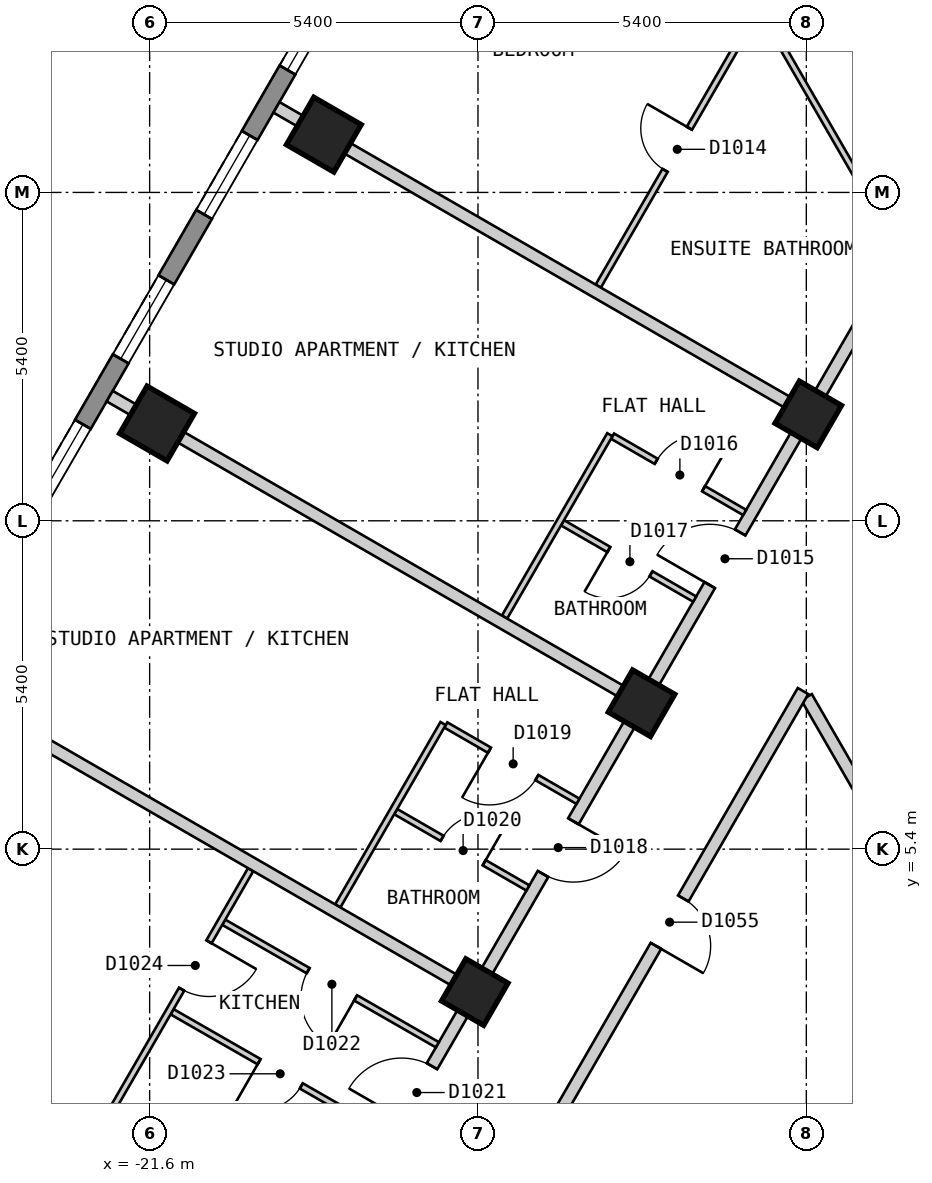
"""IFC4 building model, lengths in metres.
Left out: names, types, materials, properties, quantities, classifications, styles, units other than length and angle.
Written with IfcOpenShell. Run it as: python <this file> out.ifc"""

import sys

from ifc_helpers import new_model, si_unit, direction, frame, frame_2d, origin, origin_2d, place, context, subcontext, project, spatial, polyline, rectangle, outline, extrude, element, fill, save


model = new_model("IFC4")
c1 = context("Model", 3, precision=1e-05, world=origin(), true_north=direction((0.0, 1.0)))
c2 = subcontext(c1, "Body", "Model", "MODEL_VIEW")
j1 = project(units=[si_unit("LENGTHUNIT", "METRE"), si_unit("PLANEANGLEUNIT", "RADIAN")], contexts=[c1])
p1 = place(None, origin())
s1 = spatial("IfcSite", under=j1, at=p1, CompositionType="ELEMENT")
p2 = place(p1, origin())
s2 = spatial("IfcBuilding", under=s1, at=p2, CompositionType="ELEMENT")
p3 = place(p2, frame((0.0, 0.0, 126.6)))
s3 = spatial("IfcBuildingStorey", under=s2, at=p3, CompositionType="ELEMENT", Elevation=126.6)
for number, where, z_axis, x_axis in (
    (1, (-18.735, 17.15, 0.0), (0.0, 0.0, 1.0), (-0.5, -0.866, 0.0)),
    (2, (-21.478, 12.4, 0.0), (0.0, 0.0, 1.0), (-0.5, -0.866, 0.0)),
):
    element("IfcColumn", number, at=place(p3, frame(where, z_axis=z_axis, x_axis=x_axis)), inside=s3, PredefinedType="COLUMN", context=c2, shape_type="SweptSolid", body=[
        extrude(rectangle(XDim=0.9, YDim=0.9, at=origin_2d()), origin(), (0.0, 0.0, 1.0), 3.0),
    ])
for number, where, z_axis, x_axis in (
    (3, (-10.768, 12.55, 0.0), (0.0, 0.0, 1.0), (-0.5, -0.866, 0.0)),
    (4, (-13.51, 7.8, 0.0), (0.0, 0.0, 1.0), (-0.5, -0.866, 0.0)),
    (5, (-16.253, 3.05, 0.0), (0.0, 0.0, 1.0), (-0.5, -0.866, 0.0)),
):
    element("IfcColumn", number, at=place(p3, frame(where, z_axis=z_axis, x_axis=x_axis)), inside=s3, PredefinedType="COLUMN", context=c2, shape_type="SweptSolid", body=[
        extrude(rectangle(XDim=0.8, YDim=0.8, at=origin_2d()), origin(), (0.0, 0.0, 1.0), 3.0),
    ])
p4 = place(p3, frame((-16.555, 23.025, 0.0), z_axis=(0.0, 0.0, 1.0), x_axis=(-0.500020536353, -0.866013546791, 0.0)))
e6 = element("IfcWall", 6, at=p4, inside=s3, PredefinedType="SOLIDWALL", context=c2, shape_type="SweptSolid", body=[
    extrude(outline(polyline([(0.0, -0.15), (23.325, -0.15), (23.245, 0.15), (0.08, 0.15), (0.0, -0.15)])), origin(), (0.0, 0.0, 1.0), 2.7),
])
p5 = place(p4, frame((1.314, 0.0, 0.15)))
e7 = element("IfcOpeningElement", 7, at=p5, cuts=e6, PredefinedType="OPENING", context=c2, shape_type="SweptSolid", body=[
    extrude(rectangle(XDim=1.5, YDim=2.1, at=frame_2d((0.75, 1.05))), frame((0.0, 0.16, 0.0), z_axis=(0.0, -1.0, 0.0), x_axis=(1.0, 0.0, 0.0)), (0.0, 0.0, 1.0), 0.32),
])
p6 = place(p4, frame((4.056, 0.0, 0.15)))
e8 = element("IfcOpeningElement", 8, at=p6, cuts=e6, PredefinedType="OPENING", context=c2, shape_type="SweptSolid", body=[
    extrude(rectangle(XDim=1.5, YDim=2.1, at=frame_2d((0.75, 1.05))), frame((0.0, 0.16, 0.0), z_axis=(0.0, -1.0, 0.0), x_axis=(1.0, 0.0, 0.0)), (0.0, 0.0, 1.0), 0.32),
])
p7 = place(p4, frame((6.799, 0.0, 0.15)))
e9 = element("IfcOpeningElement", 9, at=p7, cuts=e6, PredefinedType="OPENING", context=c2, shape_type="SweptSolid", body=[
    extrude(rectangle(XDim=1.5, YDim=2.1, at=frame_2d((0.75, 1.05))), frame((0.0, 0.16, 0.0), z_axis=(0.0, -1.0, 0.0), x_axis=(1.0, 0.0, 0.0)), (0.0, 0.0, 1.0), 0.32),
])
p8 = place(p4, frame((9.541, 0.0, 0.15)))
e10 = element("IfcOpeningElement", 10, at=p8, cuts=e6, PredefinedType="OPENING", context=c2, shape_type="SweptSolid", body=[
    extrude(rectangle(XDim=1.5, YDim=2.1, at=frame_2d((0.75, 1.05))), frame((0.0, 0.16, 0.0), z_axis=(0.0, -1.0, 0.0), x_axis=(1.0, 0.0, 0.0)), (0.0, 0.0, 1.0), 0.32),
])
p9 = place(p4, frame((12.285, 0.0, 0.15)))
e11 = element("IfcOpeningElement", 11, at=p9, cuts=e6, PredefinedType="OPENING", context=c2, shape_type="SweptSolid", body=[
    extrude(rectangle(XDim=1.5, YDim=2.1, at=frame_2d((0.75, 1.05))), frame((0.0, 0.16, 0.0), z_axis=(0.0, -1.0, 0.0), x_axis=(1.0, 0.0, 0.0)), (0.0, 0.0, 1.0), 0.32),
])
p10 = place(p4, frame((15.027, 0.0, 0.15)))
e12 = element("IfcOpeningElement", 12, at=p10, cuts=e6, PredefinedType="OPENING", context=c2, shape_type="SweptSolid", body=[
    extrude(rectangle(XDim=1.5, YDim=2.1, at=frame_2d((0.75, 1.05))), frame((0.0, 0.16, 0.0), z_axis=(0.0, -1.0, 0.0), x_axis=(1.0, 0.0, 0.0)), (0.0, 0.0, 1.0), 0.32),
])
p11 = place(p4, frame((17.769, 0.0, 0.15)))
e13 = element("IfcOpeningElement", 13, at=p11, cuts=e6, PredefinedType="OPENING", context=c2, shape_type="SweptSolid", body=[
    extrude(rectangle(XDim=1.5, YDim=2.1, at=frame_2d((0.75, 1.05))), frame((0.0, 0.16, 0.0), z_axis=(0.0, -1.0, 0.0), x_axis=(1.0, 0.0, 0.0)), (0.0, 0.0, 1.0), 0.32),
])
p12 = place(p4, frame((20.512, 0.0, 0.15)))
e14 = element("IfcOpeningElement", 14, at=p12, cuts=e6, PredefinedType="OPENING", context=c2, shape_type="SweptSolid", body=[
    extrude(rectangle(XDim=1.5, YDim=2.1, at=frame_2d((0.75, 1.05))), frame((0.0, 0.16, 0.0), z_axis=(0.0, -1.0, 0.0), x_axis=(1.0, 0.0, 0.0)), (0.0, 0.0, 1.0), 0.32),
])
p13 = place(p3, frame((-10.796, 7.9, 0.0), z_axis=(0.0, 0.0, 1.0), x_axis=(0.499954271211, -0.866051803703, 0.0)))
e15 = element("IfcWall", 15, at=p13, inside=s3, PredefinedType="PARTITIONING", context=c2, shape_type="SweptSolid", body=[
    extrude(rectangle(XDim=7.536, YDim=0.2, at=frame_2d((3.768, 0.0))), origin(), (0.0, 0.0, 1.0), 2.7),
])
p14 = place(p3, frame((-15.242, 0.399, 0.0), z_axis=(0.0, 0.0, 1.0), x_axis=(0.499953615651, 0.866052182145, 0.0)))
e16 = element("IfcWall", 16, at=p14, inside=s3, PredefinedType="PARTITIONING", context=c2, shape_type="SweptSolid", body=[
    extrude(rectangle(XDim=8.777, YDim=0.2, at=frame_2d((4.388, 0.0))), origin(), (0.0, 0.0, 1.0), 2.7),
])
p15 = place(p14, frame((3.938, 0.0, 0.0)))
e17 = element("IfcOpeningElement", 17, at=p15, cuts=e16, PredefinedType="OPENING", context=c2, shape_type="SweptSolid", body=[
    extrude(rectangle(XDim=0.9, YDim=2.1, at=frame_2d((0.45, 1.05))), frame((0.0, 0.11, 0.0), z_axis=(0.0, -1.0, 0.0), x_axis=(1.0, 0.0, 0.0)), (0.0, 0.0, 1.0), 0.22),
])
p16 = place(p3, frame((-17.753, 0.45, 0.0), z_axis=(0.0, 0.0, 1.0), x_axis=(0.499990970252, 0.866030617049, 0.0)))
e18 = element("IfcWall", 18, at=p16, inside=s3, PredefinedType="PARTITIONING", context=c2, shape_type="SweptSolid", body=[
    extrude(rectangle(XDim=16.974, YDim=0.2, at=frame_2d((8.487, 0.0))), origin(), (0.0, 0.0, 1.0), 2.7),
])
p17 = place(p16, frame((10.73, 0.0, 0.0)))
e19 = element("IfcOpeningElement", 19, at=p17, cuts=e18, PredefinedType="OPENING", context=c2, shape_type="SweptSolid", body=[
    extrude(rectangle(XDim=1.0, YDim=2.1, at=frame_2d((0.5, 1.05))), frame((0.0, 0.11, 0.0), z_axis=(0.0, -1.0, 0.0), x_axis=(1.0, 0.0, 0.0)), (0.0, 0.0, 1.0), 0.22),
])
p18 = place(p16, frame((5.245, 0.0, 0.0)))
e20 = element("IfcOpeningElement", 20, at=p18, cuts=e18, PredefinedType="OPENING", context=c2, shape_type="SweptSolid", body=[
    extrude(rectangle(XDim=1.0, YDim=2.1, at=frame_2d((0.5, 1.05))), frame((0.0, 0.11, 0.0), z_axis=(0.0, -1.0, 0.0), x_axis=(1.0, 0.0, 0.0)), (0.0, 0.0, 1.0), 0.22),
])
p19 = place(p16, frame((0.594, 0.0, 0.0)))
e21 = element("IfcOpeningElement", 21, at=p19, cuts=e18, PredefinedType="OPENING", context=c2, shape_type="SweptSolid", body=[
    extrude(rectangle(XDim=1.0, YDim=2.1, at=frame_2d((0.5, 1.05))), frame((0.0, 0.11, 0.0), z_axis=(0.0, -1.0, 0.0), x_axis=(1.0, 0.0, 0.0)), (0.0, 0.0, 1.0), 0.22),
])
p20 = place(p3, frame((-14.37, 24.09, 0.0), z_axis=(0.0, 0.0, 1.0), x_axis=(0.50002438799, -0.866011322914, 0.0)))
e22 = element("IfcWall", 22, at=p20, inside=s3, PredefinedType="PARTITIONING", context=c2, shape_type="SweptSolid", body=[
    extrude(rectangle(XDim=10.266, YDim=0.1, at=frame_2d((5.133, 0.0))), origin(), (0.0, 0.0, 1.0), 2.7),
])
p21 = place(p20, frame((2.347, 0.0, 0.0)))
e23 = element("IfcOpeningElement", 23, at=p21, cuts=e22, PredefinedType="OPENING", context=c2, shape_type="SweptSolid", body=[
    extrude(rectangle(XDim=0.9, YDim=2.1, at=frame_2d((0.45, 1.05))), frame((0.0, 0.06, 0.0), z_axis=(0.0, -1.0, 0.0), x_axis=(1.0, 0.0, 0.0)), (0.0, 0.0, 1.0), 0.12),
])
p22 = place(p3, frame((-17.553, 6.017, 0.0), z_axis=(0.0, 0.0, 1.0), x_axis=(0.866038211682, -0.499977815414, 0.0)))
e24 = element("IfcWall", 24, at=p22, inside=s3, PredefinedType="PARTITIONING", context=c2, shape_type="SweptSolid", body=[
    extrude(rectangle(XDim=2.51, YDim=0.1, at=frame_2d((1.255, 0.0))), origin(), (0.0, 0.0, 1.0), 2.7),
])
p23 = place(p22, frame((0.88, 0.0, 0.0)))
e25 = element("IfcOpeningElement", 25, at=p23, cuts=e24, PredefinedType="OPENING", context=c2, shape_type="SweptSolid", body=[
    extrude(rectangle(XDim=0.8, YDim=2.1, at=frame_2d((0.4, 1.05))), frame((0.0, 0.06, 0.0), z_axis=(0.0, -1.0, 0.0), x_axis=(1.0, 0.0, 0.0)), (0.0, 0.0, 1.0), 0.12),
])
p24 = place(p3, frame((-20.381, 4.198, 0.0), z_axis=(0.0, 0.0, 1.0), x_axis=(0.867459321792, -0.497508115549, 0.0)))
e26 = element("IfcWall", 26, at=p24, inside=s3, PredefinedType="PARTITIONING", context=c2, shape_type="SweptSolid", body=[
    extrude(rectangle(XDim=4.05, YDim=0.1, at=frame_2d((2.025, 0.0))), origin(), (0.0, 0.0, 1.0), 2.7),
])
p25 = place(p24, frame((1.6, 0.0, 0.0)))
e27 = element("IfcOpeningElement", 27, at=p25, cuts=e26, PredefinedType="OPENING", context=c2, shape_type="SweptSolid", body=[
    extrude(rectangle(XDim=0.9, YDim=2.1, at=frame_2d((0.45, 1.05))), frame((0.0, 0.06, 0.0), z_axis=(0.0, -1.0, 0.0), x_axis=(1.0, 0.0, 0.0)), (0.0, 0.0, 1.0), 0.12),
])
p26 = place(p3, frame((-21.231, 2.726, 0.0), z_axis=(0.0, 0.0, 1.0), x_axis=(0.867314299312, -0.497760892607, 0.0)))
e28 = element("IfcWall", 28, at=p26, inside=s3, PredefinedType="PARTITIONING", context=c2, shape_type="SweptSolid", body=[
    extrude(rectangle(XDim=4.05, YDim=0.1, at=frame_2d((2.025, 0.0))), origin(), (0.0, 0.0, 1.0), 2.7),
])
p27 = place(p26, frame((1.65, 0.0, 0.0)))
e29 = element("IfcOpeningElement", 29, at=p27, cuts=e28, PredefinedType="OPENING", context=c2, shape_type="SweptSolid", body=[
    extrude(rectangle(XDim=0.8, YDim=2.1, at=frame_2d((0.4, 1.05))), frame((0.0, 0.06, 0.0), z_axis=(0.0, -1.0, 0.0), x_axis=(1.0, 0.0, 0.0)), (0.0, 0.0, 1.0), 0.12),
])
p28 = place(p3, frame((-16.729, 7.442, 0.0), z_axis=(0.0, 0.0, 1.0), x_axis=(0.865983051302, -0.500073349477, 0.0)))
e30 = element("IfcWall", 30, at=p28, inside=s3, PredefinedType="PARTITIONING", context=c2, shape_type="SweptSolid", body=[
    extrude(rectangle(XDim=2.509, YDim=0.1, at=frame_2d((1.255, 0.0))), origin(), (0.0, 0.0, 1.0), 2.7),
])
p29 = place(p28, frame((0.829, 0.0, 0.0)))
e31 = element("IfcOpeningElement", 31, at=p29, cuts=e30, PredefinedType="OPENING", context=c2, shape_type="SweptSolid", body=[
    extrude(rectangle(XDim=0.9, YDim=2.1, at=frame_2d((0.45, 1.05))), frame((0.0, 0.06, 0.0), z_axis=(0.0, -1.0, 0.0), x_axis=(1.0, 0.0, 0.0)), (0.0, 0.0, 1.0), 0.12),
])
p30 = place(p3, frame((-13.987, 12.192, 0.0), z_axis=(0.0, 0.0, 1.0), x_axis=(0.865983051302, -0.500073349477, 0.0)))
e32 = element("IfcWall", 32, at=p30, inside=s3, PredefinedType="PARTITIONING", context=c2, shape_type="SweptSolid", body=[
    extrude(rectangle(XDim=2.509, YDim=0.1, at=frame_2d((1.255, 0.0))), origin(), (0.0, 0.0, 1.0), 2.7),
])
p31 = place(p30, frame((0.829, 0.0, 0.0)))
e33 = element("IfcOpeningElement", 33, at=p31, cuts=e32, PredefinedType="OPENING", context=c2, shape_type="SweptSolid", body=[
    extrude(rectangle(XDim=0.9, YDim=2.1, at=frame_2d((0.45, 1.05))), frame((0.0, 0.06, 0.0), z_axis=(0.0, -1.0, 0.0), x_axis=(1.0, 0.0, 0.0)), (0.0, 0.0, 1.0), 0.12),
])
p32 = place(p3, frame((-14.81, 10.767, 0.0), z_axis=(0.0, 0.0, 1.0), x_axis=(0.866038211682, -0.499977815414, 0.0)))
e34 = element("IfcWall", 34, at=p32, inside=s3, PredefinedType="PARTITIONING", context=c2, shape_type="SweptSolid", body=[
    extrude(rectangle(XDim=2.51, YDim=0.1, at=frame_2d((1.255, 0.0))), origin(), (0.0, 0.0, 1.0), 2.7),
])
p33 = place(p32, frame((0.88, 0.0, 0.0)))
e35 = element("IfcOpeningElement", 35, at=p33, cuts=e34, PredefinedType="OPENING", context=c2, shape_type="SweptSolid", body=[
    extrude(rectangle(XDim=0.8, YDim=2.1, at=frame_2d((0.4, 1.05))), frame((0.0, 0.06, 0.0), z_axis=(0.0, -1.0, 0.0), x_axis=(1.0, 0.0, 0.0)), (0.0, 0.0, 1.0), 0.12),
])
p34 = place(p3, frame((-18.506, 4.466, 0.0), z_axis=(0.0, 0.0, 1.0), x_axis=(0.500027479704, 0.866009537788, 0.0)))
e36 = element("IfcWall", 36, at=p34, inside=s3, PredefinedType="PARTITIONING", context=c2, shape_type="SweptSolid", body=[
    extrude(rectangle(XDim=3.464, YDim=0.1, at=frame_2d((1.732, 0.0))), origin(), (0.0, 0.0, 1.0), 2.7),
])
p35 = place(p3, frame((-15.763, 9.217, 0.0), z_axis=(0.0, 0.0, 1.0), x_axis=(0.500096714907, 0.865969558206, 0.0)))
e37 = element("IfcWall", 37, at=p35, inside=s3, PredefinedType="PARTITIONING", context=c2, shape_type="SweptSolid", body=[
    extrude(rectangle(XDim=3.463, YDim=0.1, at=frame_2d((1.731, 0.0))), origin(), (0.0, 0.0, 1.0), 2.7),
])
p36 = place(p3, frame((-14.222, 14.659, 0.0), z_axis=(0.0, 0.0, 1.0), x_axis=(0.500053212623, 0.865994679283, 0.0)))
e38 = element("IfcWall", 38, at=p36, inside=s3, PredefinedType="PARTITIONING", context=c2, shape_type="SweptSolid", body=[
    extrude(rectangle(XDim=5.239, YDim=0.1, at=frame_2d((2.62, 0.0))), origin(), (0.0, 0.0, 1.0), 2.7),
])
p37 = place(p36, frame((2.198, 0.0, 0.0)))
e39 = element("IfcOpeningElement", 39, at=p37, cuts=e38, PredefinedType="OPENING", context=c2, shape_type="SweptSolid", body=[
    extrude(rectangle(XDim=0.8, YDim=2.1, at=frame_2d((0.4, 1.05))), frame((0.0, 0.06, 0.0), z_axis=(0.0, -1.0, 0.0), x_axis=(1.0, 0.0, 0.0)), (0.0, 0.0, 1.0), 0.12),
])
p38 = place(p3, frame((-22.603, 0.449, 0.0), z_axis=(0.0, 0.0, 1.0), x_axis=(0.500022588228, 0.866012362072, 0.0)))
e40 = element("IfcWall", 40, at=p38, inside=s3, PredefinedType="PARTITIONING", context=c2, shape_type="SweptSolid", body=[
    extrude(rectangle(XDim=5.328, YDim=0.1, at=frame_2d((2.664, 0.0))), origin(), (0.0, 0.0, 1.0), 2.7),
])
p39 = place(p38, frame((3.058, 0.0, 0.0)))
e41 = element("IfcOpeningElement", 41, at=p39, cuts=e40, PredefinedType="OPENING", context=c2, shape_type="SweptSolid", body=[
    extrude(rectangle(XDim=0.9, YDim=2.1, at=frame_2d((0.45, 1.05))), frame((0.0, 0.06, 0.0), z_axis=(0.0, -1.0, 0.0), x_axis=(1.0, 0.0, 0.0)), (0.0, 0.0, 1.0), 0.12),
])
p40 = place(p3, frame((-24.999, 8.1, 0.0), z_axis=(0.0, 0.0, 1.0), x_axis=(0.866016855193, -0.500014806302, 0.0)))
e42 = element("IfcWall", 42, at=p40, inside=s3, PredefinedType="PARTITIONING", context=c2, shape_type="SweptSolid", body=[
    extrude(rectangle(XDim=10.0, YDim=0.2, at=frame_2d((5.0, 0.0))), origin(), (0.0, 0.0, 1.0), 2.7),
])
p41 = place(p3, frame((-22.257, 12.85, 0.0), z_axis=(0.0, 0.0, 1.0), x_axis=(0.866047370643, -0.499961950354, 0.0)))
e43 = element("IfcWall", 43, at=p41, inside=s3, PredefinedType="PARTITIONING", context=c2, shape_type="SweptSolid", body=[
    extrude(rectangle(XDim=10.001, YDim=0.2, at=frame_2d((5.0, 0.0))), origin(), (0.0, 0.0, 1.0), 2.7),
])
p42 = place(p3, frame((-19.514, 17.599, 0.0), z_axis=(0.0, 0.0, 1.0), x_axis=(0.866059142644, -0.499941558027, 0.0)))
e44 = element("IfcWall", 44, at=p42, inside=s3, PredefinedType="PARTITIONING", context=c2, shape_type="SweptSolid", body=[
    extrude(rectangle(XDim=9.999, YDim=0.2, at=frame_2d((5.0, 0.0))), origin(), (0.0, 0.0, 1.0), 2.7),
])
p43 = place(p6, origin())
e45 = element("IfcWindow", 45, at=p43, inside=s3, PartitioningType="SINGLE_PANEL", PredefinedType="WINDOW", context=c2, shape_type="SweptSolid", body=[
    extrude(rectangle(XDim=1.5, YDim=2.1, at=frame_2d((0.75, 1.05))), frame((0.0, 0.03, 0.0), z_axis=(0.0, -1.0, 0.0), x_axis=(1.0, 0.0, 0.0)), (0.0, 0.0, 1.0), 0.06),
])
fill(e8, e45)
p44 = place(p7, origin())
e46 = element("IfcWindow", 46, at=p44, inside=s3, PartitioningType="SINGLE_PANEL", PredefinedType="WINDOW", context=c2, shape_type="SweptSolid", body=[
    extrude(rectangle(XDim=1.5, YDim=2.1, at=frame_2d((0.75, 1.05))), frame((0.0, 0.03, 0.0), z_axis=(0.0, -1.0, 0.0), x_axis=(1.0, 0.0, 0.0)), (0.0, 0.0, 1.0), 0.06),
])
fill(e9, e46)
p45 = place(p8, origin())
e47 = element("IfcWindow", 47, at=p45, inside=s3, PartitioningType="SINGLE_PANEL", PredefinedType="WINDOW", context=c2, shape_type="SweptSolid", body=[
    extrude(rectangle(XDim=1.5, YDim=2.1, at=frame_2d((0.75, 1.05))), frame((0.0, 0.03, 0.0), z_axis=(0.0, -1.0, 0.0), x_axis=(1.0, 0.0, 0.0)), (0.0, 0.0, 1.0), 0.06),
])
fill(e10, e47)
p46 = place(p9, origin())
e48 = element("IfcWindow", 48, at=p46, inside=s3, PartitioningType="SINGLE_PANEL", PredefinedType="WINDOW", context=c2, shape_type="SweptSolid", body=[
    extrude(rectangle(XDim=1.5, YDim=2.1, at=frame_2d((0.75, 1.05))), frame((0.0, 0.03, 0.0), z_axis=(0.0, -1.0, 0.0), x_axis=(1.0, 0.0, 0.0)), (0.0, 0.0, 1.0), 0.06),
])
fill(e11, e48)
p47 = place(p37, origin())
e49 = element("IfcDoor", 49, at=p47, inside=s3, OperationType="SINGLE_SWING_RIGHT", PredefinedType="DOOR", context=c2, shape_type="SweptSolid", body=[
    extrude(rectangle(XDim=0.8, YDim=2.1, at=frame_2d((0.4, 1.05))), frame((0.0, 0.025, 0.0), z_axis=(0.0, -1.0, 0.0), x_axis=(1.0, 0.0, 0.0)), (0.0, 0.0, 1.0), 0.05),
])
fill(e39, e49)
p48 = place(p17, origin())
e50 = element("IfcDoor", 50, at=p48, inside=s3, OperationType="SINGLE_SWING_LEFT", PredefinedType="DOOR", context=c2, shape_type="SweptSolid", body=[
    extrude(rectangle(XDim=1.0, YDim=2.1, at=frame_2d((0.5, 1.05))), frame((0.0, 0.025, 0.0), z_axis=(0.0, -1.0, 0.0), x_axis=(1.0, 0.0, 0.0)), (0.0, 0.0, 1.0), 0.05),
])
fill(e19, e50)
p49 = place(p31, origin())
e51 = element("IfcDoor", 51, at=p49, inside=s3, OperationType="SINGLE_SWING_RIGHT", PredefinedType="DOOR", context=c2, shape_type="SweptSolid", body=[
    extrude(rectangle(XDim=0.9, YDim=2.1, at=frame_2d((0.45, 1.05))), frame((0.0, 0.025, 0.0), z_axis=(0.0, -1.0, 0.0), x_axis=(1.0, 0.0, 0.0)), (0.0, 0.0, 1.0), 0.05),
])
fill(e33, e51)
p50 = place(p33, origin())
e52 = element("IfcDoor", 52, at=p50, inside=s3, OperationType="SINGLE_SWING_LEFT", PredefinedType="DOOR", context=c2, shape_type="SweptSolid", body=[
    extrude(rectangle(XDim=0.8, YDim=2.1, at=frame_2d((0.4, 1.05))), frame((0.0, 0.025, 0.0), z_axis=(0.0, -1.0, 0.0), x_axis=(1.0, 0.0, 0.0)), (0.0, 0.0, 1.0), 0.05),
])
fill(e35, e52)
p51 = place(p18, origin())
e53 = element("IfcDoor", 53, at=p51, inside=s3, OperationType="SINGLE_SWING_RIGHT", PredefinedType="DOOR", context=c2, shape_type="SweptSolid", body=[
    extrude(rectangle(XDim=1.0, YDim=2.1, at=frame_2d((0.5, 1.05))), frame((0.0, 0.025, 0.0), z_axis=(0.0, -1.0, 0.0), x_axis=(1.0, 0.0, 0.0)), (0.0, 0.0, 1.0), 0.05),
])
fill(e20, e53)
p52 = place(p29, origin())
e54 = element("IfcDoor", 54, at=p52, inside=s3, OperationType="SINGLE_SWING_LEFT", PredefinedType="DOOR", context=c2, shape_type="SweptSolid", body=[
    extrude(rectangle(XDim=0.9, YDim=2.1, at=frame_2d((0.45, 1.05))), frame((0.0, 0.025, 0.0), z_axis=(0.0, -1.0, 0.0), x_axis=(1.0, 0.0, 0.0)), (0.0, 0.0, 1.0), 0.05),
])
fill(e31, e54)
p53 = place(p23, origin())
e55 = element("IfcDoor", 55, at=p53, inside=s3, OperationType="SINGLE_SWING_RIGHT", PredefinedType="DOOR", context=c2, shape_type="SweptSolid", body=[
    extrude(rectangle(XDim=0.8, YDim=2.1, at=frame_2d((0.4, 1.05))), frame((0.0, 0.025, 0.0), z_axis=(0.0, -1.0, 0.0), x_axis=(1.0, 0.0, 0.0)), (0.0, 0.0, 1.0), 0.05),
])
fill(e25, e55)
p54 = place(p19, origin())
e56 = element("IfcDoor", 56, at=p54, inside=s3, OperationType="SINGLE_SWING_LEFT", PredefinedType="DOOR", context=c2, shape_type="SweptSolid", body=[
    extrude(rectangle(XDim=1.0, YDim=2.1, at=frame_2d((0.5, 1.05))), frame((0.0, 0.025, 0.0), z_axis=(0.0, -1.0, 0.0), x_axis=(1.0, 0.0, 0.0)), (0.0, 0.0, 1.0), 0.05),
])
fill(e21, e56)
p55 = place(p25, origin())
e57 = element("IfcDoor", 57, at=p55, inside=s3, OperationType="SINGLE_SWING_RIGHT", PredefinedType="DOOR", context=c2, shape_type="SweptSolid", body=[
    extrude(rectangle(XDim=0.9, YDim=2.1, at=frame_2d((0.45, 1.05))), frame((0.0, 0.025, 0.0), z_axis=(0.0, -1.0, 0.0), x_axis=(1.0, 0.0, 0.0)), (0.0, 0.0, 1.0), 0.05),
])
fill(e27, e57)
p56 = place(p27, origin())
e58 = element("IfcDoor", 58, at=p56, inside=s3, OperationType="SINGLE_SWING_LEFT", PredefinedType="DOOR", context=c2, shape_type="SweptSolid", body=[
    extrude(rectangle(XDim=0.8, YDim=2.1, at=frame_2d((0.4, 1.05))), frame((0.0, 0.025, 0.0), z_axis=(0.0, -1.0, 0.0), x_axis=(1.0, 0.0, 0.0)), (0.0, 0.0, 1.0), 0.05),
])
fill(e29, e58)
p57 = place(p39, origin())
e59 = element("IfcDoor", 59, at=p57, inside=s3, OperationType="SINGLE_SWING_RIGHT", PredefinedType="DOOR", context=c2, shape_type="SweptSolid", body=[
    extrude(rectangle(XDim=0.9, YDim=2.1, at=frame_2d((0.45, 1.05))), frame((0.0, 0.025, 0.0), z_axis=(0.0, -1.0, 0.0), x_axis=(1.0, 0.0, 0.0)), (0.0, 0.0, 1.0), 0.05),
])
fill(e41, e59)
p58 = place(p15, origin())
e60 = element("IfcDoor", 60, at=p58, inside=s3, OperationType="SINGLE_SWING_LEFT", PredefinedType="DOOR", context=c2, shape_type="SweptSolid", body=[
    extrude(rectangle(XDim=0.9, YDim=2.1, at=frame_2d((0.45, 1.05))), frame((0.0, 0.025, 0.0), z_axis=(0.0, -1.0, 0.0), x_axis=(1.0, 0.0, 0.0)), (0.0, 0.0, 1.0), 0.05),
])
fill(e17, e60)
save(model, sys.argv[1])
